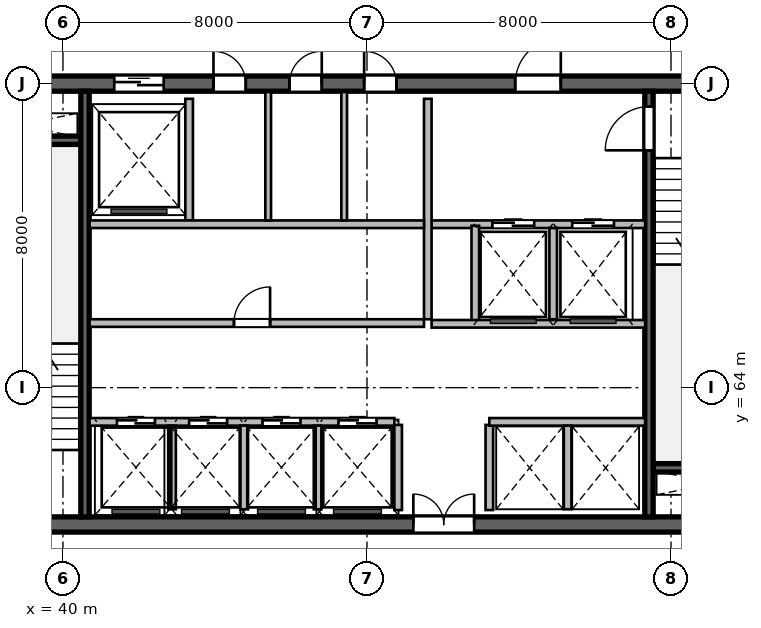
"""IFC4 building model, lengths in metres.
Left out: names, types, materials, properties, quantities, classifications, styles, units other than length and angle.
Written with IfcOpenShell. Run it as: python <this file> out.ifc"""

import sys

from ifc_helpers import new_model, si_unit, direction, frame, frame_2d, origin, place, context, subcontext, project, spatial, rectangle, extrude, source, transform, mapped, element, fill, save


model = new_model("IFC4")
c1 = context("Model", 3, precision=1e-05, world=origin(), true_north=direction((0.0, 1.0)))
c2 = subcontext(c1, "Body", "Model", "MODEL_VIEW")
j1 = project(units=[si_unit("LENGTHUNIT", "METRE"), si_unit("PLANEANGLEUNIT", "RADIAN")], contexts=[c1])
p1 = place(None, origin())
s1 = spatial("IfcSite", under=j1, at=p1, CompositionType="ELEMENT")
p2 = place(p1, origin())
s2 = spatial("IfcBuilding", under=s1, at=p2, CompositionType="ELEMENT")
p3 = place(p2, frame((0.0, 0.0, 275.7)))
s3 = spatial("IfcBuildingStorey", under=s2, at=p3, CompositionType="ELEMENT", Elevation=275.7)
m1 = source(origin(), c2, "Body", "SweptSolid", [
    extrude(rectangle(XDim=21.6, YDim=0.4, at=frame_2d((10.8, 0.0))), origin(), (0.0, 0.0, 1.0), 3.9),
])
p4 = place(p3, frame((37.2, 60.4, 0.0), z_axis=(0.0, 0.0, 1.0), x_axis=(1.0, 0.0, 0.0)))
e1 = element("IfcWall", 1, at=p4, inside=s3, PredefinedType="SHEAR", context=c2, shape_type="MappedRepresentation", body=[
    mapped(m1, transform((0.0, 0.0, 0.0), scale=1.0)),
])
p5 = place(p4, frame((1.1, 0.0, 0.0)))
e2 = element("IfcOpeningElement", 2, at=p5, cuts=e1, PredefinedType="OPENING", context=c2, shape_type="SweptSolid", body=[
    extrude(rectangle(XDim=1.15, YDim=2.15, at=frame_2d((0.575, 1.075))), frame((0.0, 0.21, 0.0), z_axis=(0.0, -1.0, 0.0), x_axis=(1.0, 0.0, 0.0)), (0.0, 0.0, 1.0), 0.42),
])
p6 = place(p4, frame((19.5, 0.0, 0.0)))
e3 = element("IfcOpeningElement", 3, at=p6, cuts=e1, PredefinedType="OPENING", context=c2, shape_type="SweptSolid", body=[
    extrude(rectangle(XDim=0.9, YDim=2.1, at=frame_2d((0.45, 1.05))), frame((0.0, 0.21, 0.0), z_axis=(0.0, -1.0, 0.0), x_axis=(1.0, 0.0, 0.0)), (0.0, 0.0, 1.0), 0.42),
])
p7 = place(p4, frame((12.02, 0.0, 0.0)))
e4 = element("IfcOpeningElement", 4, at=p7, cuts=e1, PredefinedType="OPENING", context=c2, shape_type="SweptSolid", body=[
    extrude(rectangle(XDim=1.6, YDim=2.15, at=frame_2d((0.8, 1.075))), frame((0.0, 0.21, 0.0), z_axis=(0.0, -1.0, 0.0), x_axis=(1.0, 0.0, 0.0)), (0.0, 0.0, 1.0), 0.42),
])
p8 = place(p3, frame((37.2, 72.0, 0.0), z_axis=(0.0, 0.0, 1.0), x_axis=(1.0, 0.0, 0.0)))
e5 = element("IfcWall", 5, at=p8, inside=s3, PredefinedType="SHEAR", context=c2, shape_type="MappedRepresentation", body=[
    mapped(m1, transform((0.0, 0.0, 0.0), scale=1.0)),
])
p9 = place(p8, frame((1.2, 0.0, 0.0)))
e6 = element("IfcOpeningElement", 6, at=p9, cuts=e5, PredefinedType="OPENING", context=c2, shape_type="SweptSolid", body=[
    extrude(rectangle(XDim=0.9, YDim=2.1, at=frame_2d((0.45, 1.05))), frame((0.0, 0.21, 0.0), z_axis=(0.0, -1.0, 0.0), x_axis=(1.0, 0.0, 0.0)), (0.0, 0.0, 1.0), 0.42),
])
p10 = place(p8, frame((14.7, 0.0, 0.0)))
e7 = element("IfcOpeningElement", 7, at=p10, cuts=e5, PredefinedType="OPENING", context=c2, shape_type="SweptSolid", body=[
    extrude(rectangle(XDim=1.2, YDim=2.15, at=frame_2d((0.6, 1.075))), frame((0.0, 0.21, 0.0), z_axis=(0.0, -1.0, 0.0), x_axis=(1.0, 0.0, 0.0)), (0.0, 0.0, 1.0), 0.42),
])
p11 = place(p8, frame((4.15, 0.0, 0.0)))
e8 = element("IfcOpeningElement", 8, at=p11, cuts=e5, PredefinedType="OPENING", context=c2, shape_type="SweptSolid", body=[
    extrude(rectangle(XDim=1.3, YDim=2.15, at=frame_2d((0.65, 1.075))), frame((0.0, 0.21, 0.0), z_axis=(0.0, -1.0, 0.0), x_axis=(1.0, 0.0, 0.0)), (0.0, 0.0, 1.0), 0.42),
])
p12 = place(p8, frame((6.76, 0.0, 0.0)))
e9 = element("IfcOpeningElement", 9, at=p12, cuts=e5, PredefinedType="OPENING", context=c2, shape_type="SweptSolid", body=[
    extrude(rectangle(XDim=0.85, YDim=2.1, at=frame_2d((0.425, 1.05))), frame((0.0, 0.21, 0.0), z_axis=(0.0, -1.0, 0.0), x_axis=(1.0, 0.0, 0.0)), (0.0, 0.0, 1.0), 0.42),
])
p13 = place(p8, frame((8.76, 0.0, 0.0)))
e10 = element("IfcOpeningElement", 10, at=p13, cuts=e5, PredefinedType="OPENING", context=c2, shape_type="SweptSolid", body=[
    extrude(rectangle(XDim=0.85, YDim=2.1, at=frame_2d((0.425, 1.05))), frame((0.0, 0.21, 0.0), z_axis=(0.0, -1.0, 0.0), x_axis=(1.0, 0.0, 0.0)), (0.0, 0.0, 1.0), 0.42),
])
p14 = place(p8, frame((10.725, 0.0, 0.0)))
e11 = element("IfcOpeningElement", 11, at=p14, cuts=e5, PredefinedType="OPENING", context=c2, shape_type="SweptSolid", body=[
    extrude(rectangle(XDim=0.85, YDim=2.1, at=frame_2d((0.425, 1.05))), frame((0.0, 0.21, 0.0), z_axis=(0.0, -1.0, 0.0), x_axis=(1.0, 0.0, 0.0)), (0.0, 0.0, 1.0), 0.42),
])
m2 = source(origin(), c2, "Body", "SweptSolid", [
    extrude(rectangle(XDim=3.27, YDim=0.22, at=frame_2d((1.635, 0.0))), origin(), (0.0, 0.0, 1.0), 3.9),
])
for number, where, z_axis, x_axis in (
    (12, (37.2, 70.51, 0.0), (0.0, 0.0, 1.0), (1.0, 0.0, 0.0)),
    (13, (55.53, 61.89, 0.0), (0.0, 0.0, 1.0), (1.0, 0.0, 0.0)),
):
    element("IfcWall", number, at=place(p3, frame(where, z_axis=z_axis, x_axis=x_axis)), inside=s3, PredefinedType="SHEAR", context=c2, shape_type="MappedRepresentation", body=[
        mapped(m2, transform((0.0, 0.0, 0.0), scale=1.0)),
    ])
m3 = source(origin(), c2, "Body", "SweptSolid", [
    extrude(rectangle(XDim=11.2, YDim=0.22, at=frame_2d((5.6, 0.0))), origin(), (0.0, 0.0, 1.0), 3.9),
])
p15 = place(p3, frame((40.58, 60.6, 0.0), z_axis=(0.0, 0.0, 1.0), x_axis=(0.0, 1.0, 0.0)))
e14 = element("IfcWall", 14, at=p15, inside=s3, PredefinedType="SHEAR", context=c2, shape_type="MappedRepresentation", body=[
    mapped(m3, transform((0.0, 0.0, 0.0), scale=1.0)),
])
p16 = place(p3, frame((55.42, 60.6, 0.0), z_axis=(0.0, 0.0, 1.0), x_axis=(0.0, 1.0, 0.0)))
e15 = element("IfcWall", 15, at=p16, inside=s3, PredefinedType="SHEAR", context=c2, shape_type="MappedRepresentation", body=[
    mapped(m3, transform((0.0, 0.0, 0.0), scale=1.0)),
])
p17 = place(p16, frame((9.645, 0.0, 0.0)))
e16 = element("IfcOpeningElement", 16, at=p17, cuts=e15, PredefinedType="OPENING", context=c2, shape_type="SweptSolid", body=[
    extrude(rectangle(XDim=1.15, YDim=2.15, at=frame_2d((0.575, 1.075))), frame((0.0, 0.12, 0.0), z_axis=(0.0, -1.0, 0.0), x_axis=(1.0, 0.0, 0.0)), (0.0, 0.0, 1.0), 0.24),
])
m4 = source(origin(), c2, "Body", "SweptSolid", [
    extrude(rectangle(XDim=2.24, YDim=0.2, at=frame_2d((1.12, 0.0))), origin(), (0.0, 0.0, 1.0), 3.64),
])
for number, where, z_axis, x_axis in (
    (17, (48.82, 60.78, 0.0), (0.0, 0.0, 1.0), (0.0, 1.0, 0.0)),
    (18, (51.22, 60.78, 0.0), (0.0, 0.0, 1.0), (0.0, 1.0, 0.0)),
):
    element("IfcWall", number, at=place(p3, frame(where, z_axis=z_axis, x_axis=x_axis)), inside=s3, PredefinedType="SOLIDWALL", context=c2, shape_type="MappedRepresentation", body=[
        mapped(m4, transform((0.0, 0.0, 0.0), scale=1.0)),
    ])
m5 = source(origin(), c2, "Body", "SweptSolid", [
    extrude(rectangle(XDim=5.62, YDim=0.2, at=frame_2d((2.81, 0.0))), origin(), (0.0, 0.0, 1.0), 3.64),
])
p18 = place(p3, frame((49.7, 68.3, 0.0), z_axis=(0.0, 0.0, 1.0), x_axis=(1.0, 0.0, 0.0)))
e19 = element("IfcWall", 19, at=p18, inside=s3, PredefinedType="SOLIDWALL", context=c2, shape_type="MappedRepresentation", body=[
    mapped(m5, transform((0.0, 0.0, 0.0), scale=1.0)),
])
p19 = place(p18, frame((1.6, 0.0, 0.0)))
e20 = element("IfcOpeningElement", 20, at=p19, cuts=e19, PredefinedType="OPENING", context=c2, shape_type="SweptSolid", body=[
    extrude(rectangle(XDim=1.1, YDim=2.15, at=frame_2d((0.55, 1.075))), frame((0.0, 0.11, 0.0), z_axis=(0.0, -1.0, 0.0), x_axis=(1.0, 0.0, 0.0)), (0.0, 0.0, 1.0), 0.22),
])
p20 = place(p18, frame((3.7, 0.0, 0.0)))
e21 = element("IfcOpeningElement", 21, at=p20, cuts=e19, PredefinedType="OPENING", context=c2, shape_type="SweptSolid", body=[
    extrude(rectangle(XDim=1.1, YDim=2.15, at=frame_2d((0.55, 1.075))), frame((0.0, 0.11, 0.0), z_axis=(0.0, -1.0, 0.0), x_axis=(1.0, 0.0, 0.0)), (0.0, 0.0, 1.0), 0.22),
])
m6 = source(origin(), c2, "Body", "SweptSolid", [
    extrude(rectangle(XDim=5.8, YDim=0.2, at=frame_2d((2.9, 0.0))), origin(), (0.0, 0.0, 1.0), 3.64),
])
p21 = place(p3, frame((49.6, 65.8, 0.0), z_axis=(0.0, 0.0, 1.0), x_axis=(0.0, 1.0, 0.0)))
e22 = element("IfcWall", 22, at=p21, inside=s3, PredefinedType="SOLIDWALL", context=c2, shape_type="MappedRepresentation", body=[
    mapped(m6, transform((0.0, 0.0, 0.0), scale=1.0)),
])
m7 = source(origin(), c2, "Body", "SweptSolid", [
    extrude(rectangle(XDim=2.58, YDim=0.2, at=frame_2d((1.29, 0.0))), origin(), (0.0, 0.0, 1.0), 3.64),
])
p22 = place(p3, frame((50.85, 65.68, 0.0), z_axis=(0.0, 0.0, 1.0), x_axis=(0.0, 1.0, 0.0)))
e23 = element("IfcWall", 23, at=p22, inside=s3, PredefinedType="SOLIDWALL", context=c2, shape_type="MappedRepresentation", body=[
    mapped(m7, transform((0.0, 0.0, 0.0), scale=1.0)),
])
m8 = source(origin(), c2, "Body", "SweptSolid", [
    extrude(rectangle(XDim=2.4, YDim=0.2, at=frame_2d((1.2, 0.0))), origin(), (0.0, 0.0, 1.0), 3.64),
])
p23 = place(p3, frame((52.9, 65.8, 0.0), z_axis=(0.0, 0.0, 1.0), x_axis=(0.0, 1.0, 0.0)))
e24 = element("IfcWall", 24, at=p23, inside=s3, PredefinedType="SOLIDWALL", context=c2, shape_type="MappedRepresentation", body=[
    mapped(m8, transform((0.0, 0.0, 0.0), scale=1.0)),
])
p24 = place(p3, frame((49.7, 65.68, 0.0), z_axis=(0.0, 0.0, 1.0), x_axis=(1.0, 0.0, 0.0)))
e25 = element("IfcWall", 25, at=p24, inside=s3, PredefinedType="SOLIDWALL", context=c2, shape_type="MappedRepresentation", body=[
    mapped(m5, transform((0.0, 0.0, 0.0), scale=1.0)),
])
m9 = source(origin(), c2, "Body", "SweptSolid", [
    extrude(rectangle(XDim=3.2, YDim=0.2, at=frame_2d((1.6, 0.0))), origin(), (0.0, 0.0, 1.0), 3.64),
])
p25 = place(p3, frame((43.32, 68.4, 0.0), z_axis=(0.0, 0.0, 1.0), x_axis=(0.0, 1.0, 0.0)))
e26 = element("IfcWall", 26, at=p25, inside=s3, PredefinedType="SOLIDWALL", context=c2, shape_type="MappedRepresentation", body=[
    mapped(m9, transform((0.0, 0.0, 0.0), scale=1.0)),
])
m10 = source(origin(), c2, "Body", "SweptSolid", [
    extrude(rectangle(XDim=8.8, YDim=0.2, at=frame_2d((4.4, 0.0))), origin(), (0.0, 0.0, 1.0), 3.64),
])
p26 = place(p3, frame((40.7, 68.3, 0.0), z_axis=(0.0, 0.0, 1.0), x_axis=(1.0, 0.0, 0.0)))
e27 = element("IfcWall", 27, at=p26, inside=s3, PredefinedType="SOLIDWALL", context=c2, shape_type="MappedRepresentation", body=[
    mapped(m10, transform((0.0, 0.0, 0.0), scale=1.0)),
])
m11 = source(origin(), c2, "Body", "SweptSolid", [
    extrude(rectangle(XDim=3.38, YDim=0.15, at=frame_2d((1.69, 0.0))), origin(), (0.0, 0.0, 1.0), 3.64),
])
for number, where, z_axis, x_axis in (
    (28, (45.4, 68.4, 0.0), (0.0, 0.0, 1.0), (0.0, 1.0, 0.0)),
    (29, (47.4, 68.4, 0.0), (0.0, 0.0, 1.0), (0.0, 1.0, 0.0)),
):
    element("IfcWall", number, at=place(p3, frame(where, z_axis=z_axis, x_axis=x_axis)), inside=s3, PredefinedType="PARTITIONING", context=c2, shape_type="MappedRepresentation", body=[
        mapped(m11, transform((0.0, 0.0, 0.0), scale=1.0)),
    ])
m12 = source(origin(), c2, "Body", "SweptSolid", [
    extrude(rectangle(XDim=8.02, YDim=0.2, at=frame_2d((4.01, 0.0))), origin(), (0.0, 0.0, 1.0), 3.64),
])
p27 = place(p3, frame((40.7, 63.1, 0.0), z_axis=(0.0, 0.0, 1.0), x_axis=(1.0, 0.0, 0.0)))
e30 = element("IfcWall", 30, at=p27, inside=s3, PredefinedType="SOLIDWALL", context=c2, shape_type="MappedRepresentation", body=[
    mapped(m12, transform((0.0, 0.0, 0.0), scale=1.0)),
])
p28 = place(p27, frame((0.72, 0.0, 0.0)))
e31 = element("IfcOpeningElement", 31, at=p28, cuts=e30, PredefinedType="OPENING", context=c2, shape_type="SweptSolid", body=[
    extrude(rectangle(XDim=1.0, YDim=2.15, at=frame_2d((0.5, 1.075))), frame((0.0, 0.11, 0.0), z_axis=(0.0, -1.0, 0.0), x_axis=(1.0, 0.0, 0.0)), (0.0, 0.0, 1.0), 0.22),
])
p29 = place(p27, frame((2.62, 0.0, 0.0)))
e32 = element("IfcOpeningElement", 32, at=p29, cuts=e30, PredefinedType="OPENING", context=c2, shape_type="SweptSolid", body=[
    extrude(rectangle(XDim=1.0, YDim=2.15, at=frame_2d((0.5, 1.075))), frame((0.0, 0.11, 0.0), z_axis=(0.0, -1.0, 0.0), x_axis=(1.0, 0.0, 0.0)), (0.0, 0.0, 1.0), 0.22),
])
p30 = place(p27, frame((4.55, 0.0, 0.0)))
e33 = element("IfcOpeningElement", 33, at=p30, cuts=e30, PredefinedType="OPENING", context=c2, shape_type="SweptSolid", body=[
    extrude(rectangle(XDim=1.0, YDim=2.15, at=frame_2d((0.5, 1.075))), frame((0.0, 0.11, 0.0), z_axis=(0.0, -1.0, 0.0), x_axis=(1.0, 0.0, 0.0)), (0.0, 0.0, 1.0), 0.22),
])
p31 = place(p27, frame((6.55, 0.0, 0.0)))
e34 = element("IfcOpeningElement", 34, at=p31, cuts=e30, PredefinedType="OPENING", context=c2, shape_type="SweptSolid", body=[
    extrude(rectangle(XDim=1.0, YDim=2.15, at=frame_2d((0.5, 1.075))), frame((0.0, 0.11, 0.0), z_axis=(0.0, -1.0, 0.0), x_axis=(1.0, 0.0, 0.0)), (0.0, 0.0, 1.0), 0.22),
])
m13 = source(origin(), c2, "Body", "SweptSolid", [
    extrude(rectangle(XDim=4.1, YDim=0.2, at=frame_2d((2.05, 0.0))), origin(), (0.0, 0.0, 1.0), 3.64),
])
p32 = place(p3, frame((51.22, 63.1, 0.0), z_axis=(0.0, 0.0, 1.0), x_axis=(1.0, 0.0, 0.0)))
e35 = element("IfcWall", 35, at=p32, inside=s3, PredefinedType="SOLIDWALL", context=c2, shape_type="MappedRepresentation", body=[
    mapped(m13, transform((0.0, 0.0, 0.0), scale=1.0)),
])
m14 = source(origin(), c2, "Body", "SweptSolid", [
    extrude(rectangle(XDim=2.2, YDim=0.2, at=frame_2d((1.1, 0.0))), origin(), (0.0, 0.0, 1.0), 3.64),
])
for number, where, z_axis, x_axis in (
    (36, (42.87, 60.8, 0.0), (0.0, 0.0, 1.0), (0.0, 1.0, 0.0)),
    (37, (44.77, 60.8, 0.0), (0.0, 0.0, 1.0), (0.0, 1.0, 0.0)),
    (38, (46.7, 60.8, 0.0), (0.0, 0.0, 1.0), (0.0, 1.0, 0.0)),
    (39, (53.28, 60.8, 0.0), (0.0, 0.0, 1.0), (0.0, 1.0, 0.0)),
):
    element("IfcWall", number, at=place(p3, frame(where, z_axis=z_axis, x_axis=x_axis)), inside=s3, PredefinedType="SOLIDWALL", context=c2, shape_type="MappedRepresentation", body=[
        mapped(m14, transform((0.0, 0.0, 0.0), scale=1.0)),
    ])
p33 = place(p3, frame((40.7, 65.7, 0.0), z_axis=(0.0, 0.0, 1.0), x_axis=(1.0, 0.0, 0.0)))
e40 = element("IfcWall", 40, at=p33, inside=s3, PredefinedType="SOLIDWALL", context=c2, shape_type="MappedRepresentation", body=[
    mapped(m10, transform((0.0, 0.0, 0.0), scale=1.0)),
])
p34 = place(p33, frame((3.8, 0.0, 0.0)))
e41 = element("IfcOpeningElement", 41, at=p34, cuts=e40, PredefinedType="OPENING", context=c2, shape_type="SweptSolid", body=[
    extrude(rectangle(XDim=0.95, YDim=2.15, at=frame_2d((0.475, 1.075))), frame((0.0, 0.11, 0.0), z_axis=(0.0, -1.0, 0.0), x_axis=(1.0, 0.0, 0.0)), (0.0, 0.0, 1.0), 0.22),
])
m15 = source(origin(), c2, "Body", "SweptSolid", [
    extrude(rectangle(XDim=1.15, YDim=2.15, at=frame_2d((0.575, 1.075))), frame((0.0, 0.025, 0.0), z_axis=(0.0, -1.0, 0.0), x_axis=(1.0, 0.0, 0.0)), (0.0, 0.0, 1.0), 0.05),
])
p35 = place(p17, origin())
e42 = element("IfcDoor", 42, at=p35, inside=s3, OperationType="SINGLE_SWING_LEFT", PredefinedType="DOOR", context=c2, shape_type="MappedRepresentation", body=[
    mapped(m15, transform((0.0, 0.0, 0.0), scale=1.0)),
])
fill(e16, e42)
m16 = source(origin(), c2, "Body", "SweptSolid", [
    extrude(rectangle(XDim=1.6, YDim=2.15, at=frame_2d((0.8, 1.075))), frame((0.0, 0.025, 0.0), z_axis=(0.0, -1.0, 0.0), x_axis=(1.0, 0.0, 0.0)), (0.0, 0.0, 1.0), 0.05),
])
p36 = place(p7, origin())
e43 = element("IfcDoor", 43, at=p36, inside=s3, OperationType="DOUBLE_DOOR_SINGLE_SWING", PredefinedType="DOOR", context=c2, shape_type="MappedRepresentation", body=[
    mapped(m16, transform((0.0, 0.0, 0.0), scale=1.0)),
])
fill(e4, e43)
m17 = source(origin(), c2, "Body", "SweptSolid", [
    extrude(rectangle(XDim=1.2, YDim=2.15, at=frame_2d((0.6, 1.075))), frame((0.0, 0.025, 0.0), z_axis=(0.0, -1.0, 0.0), x_axis=(1.0, 0.0, 0.0)), (0.0, 0.0, 1.0), 0.05),
])
p37 = place(p10, origin())
e44 = element("IfcDoor", 44, at=p37, inside=s3, OperationType="SINGLE_SWING_RIGHT", PredefinedType="DOOR", context=c2, shape_type="MappedRepresentation", body=[
    mapped(m17, transform((0.0, 0.0, 0.0), scale=1.0)),
])
fill(e7, e44)
m18 = source(origin(), c2, "Body", "SweptSolid", [
    extrude(rectangle(XDim=1.1, YDim=2.15, at=frame_2d((0.55, 1.075))), frame((0.0, 0.025, 0.0), z_axis=(0.0, -1.0, 0.0), x_axis=(1.0, 0.0, 0.0)), (0.0, 0.0, 1.0), 0.05),
])
p38 = place(p19, origin())
e45 = element("IfcDoor", 45, at=p38, inside=s3, OperationType="DOUBLE_DOOR_SLIDING", PredefinedType="DOOR", context=c2, shape_type="MappedRepresentation", body=[
    mapped(m18, transform((0.0, 0.0, 0.0), scale=1.0)),
])
fill(e20, e45)
p39 = place(p20, origin())
e46 = element("IfcDoor", 46, at=p39, inside=s3, OperationType="DOUBLE_DOOR_SLIDING", PredefinedType="DOOR", context=c2, shape_type="MappedRepresentation", body=[
    mapped(m18, transform((0.0, 0.0, 0.0), scale=1.0)),
])
fill(e21, e46)
m19 = source(origin(), c2, "Body", "SweptSolid", [
    extrude(rectangle(XDim=1.3, YDim=2.15, at=frame_2d((0.65, 1.075))), frame((0.0, 0.025, 0.0), z_axis=(0.0, -1.0, 0.0), x_axis=(1.0, 0.0, 0.0)), (0.0, 0.0, 1.0), 0.05),
])
p40 = place(p11, origin())
e47 = element("IfcDoor", 47, at=p40, inside=s3, OperationType="DOUBLE_DOOR_SLIDING", PredefinedType="DOOR", context=c2, shape_type="MappedRepresentation", body=[
    mapped(m19, transform((0.0, 0.0, 0.0), scale=1.0)),
])
fill(e8, e47)
m20 = source(origin(), c2, "Body", "SweptSolid", [
    extrude(rectangle(XDim=0.85, YDim=2.1, at=frame_2d((0.425, 1.05))), frame((0.0, 0.025, 0.0), z_axis=(0.0, -1.0, 0.0), x_axis=(1.0, 0.0, 0.0)), (0.0, 0.0, 1.0), 0.05),
])
p41 = place(p12, origin())
e48 = element("IfcDoor", 48, at=p41, inside=s3, OperationType="SINGLE_SWING_LEFT", PredefinedType="DOOR", context=c2, shape_type="MappedRepresentation", body=[
    mapped(m20, transform((0.0, 0.0, 0.0), scale=1.0)),
])
fill(e9, e48)
p42 = place(p13, origin())
e49 = element("IfcDoor", 49, at=p42, inside=s3, OperationType="SINGLE_SWING_RIGHT", PredefinedType="DOOR", context=c2, shape_type="MappedRepresentation", body=[
    mapped(m20, transform((0.0, 0.0, 0.0), scale=1.0)),
])
fill(e10, e49)
p43 = place(p14, origin())
e50 = element("IfcDoor", 50, at=p43, inside=s3, OperationType="SINGLE_SWING_LEFT", PredefinedType="DOOR", context=c2, shape_type="MappedRepresentation", body=[
    mapped(m20, transform((0.0, 0.0, 0.0), scale=1.0)),
])
fill(e11, e50)
m21 = source(origin(), c2, "Body", "SweptSolid", [
    extrude(rectangle(XDim=1.0, YDim=2.15, at=frame_2d((0.5, 1.075))), frame((0.0, 0.025, 0.0), z_axis=(0.0, -1.0, 0.0), x_axis=(1.0, 0.0, 0.0)), (0.0, 0.0, 1.0), 0.05),
])
p44 = place(p28, origin())
e51 = element("IfcDoor", 51, at=p44, inside=s3, OperationType="DOUBLE_DOOR_SLIDING", PredefinedType="DOOR", context=c2, shape_type="MappedRepresentation", body=[
    mapped(m21, transform((0.0, 0.0, 0.0), scale=1.0)),
])
fill(e31, e51)
p45 = place(p29, origin())
e52 = element("IfcDoor", 52, at=p45, inside=s3, OperationType="DOUBLE_DOOR_SLIDING", PredefinedType="DOOR", context=c2, shape_type="MappedRepresentation", body=[
    mapped(m21, transform((0.0, 0.0, 0.0), scale=1.0)),
])
fill(e32, e52)
p46 = place(p30, origin())
e53 = element("IfcDoor", 53, at=p46, inside=s3, OperationType="DOUBLE_DOOR_SLIDING", PredefinedType="DOOR", context=c2, shape_type="MappedRepresentation", body=[
    mapped(m21, transform((0.0, 0.0, 0.0), scale=1.0)),
])
fill(e33, e53)
p47 = place(p31, origin())
e54 = element("IfcDoor", 54, at=p47, inside=s3, OperationType="DOUBLE_DOOR_SLIDING", PredefinedType="DOOR", context=c2, shape_type="MappedRepresentation", body=[
    mapped(m21, transform((0.0, 0.0, 0.0), scale=1.0)),
])
fill(e34, e54)
m22 = source(origin(), c2, "Body", "SweptSolid", [
    extrude(rectangle(XDim=0.95, YDim=2.15, at=frame_2d((0.475, 1.075))), frame((0.0, 0.025, 0.0), z_axis=(0.0, -1.0, 0.0), x_axis=(1.0, 0.0, 0.0)), (0.0, 0.0, 1.0), 0.05),
])
p48 = place(p34, origin())
e55 = element("IfcDoor", 55, at=p48, inside=s3, OperationType="SINGLE_SWING_RIGHT", PredefinedType="DOOR", context=c2, shape_type="MappedRepresentation", body=[
    mapped(m22, transform((0.0, 0.0, 0.0), scale=1.0)),
])
fill(e41, e55)
save(model, sys.argv[1])
